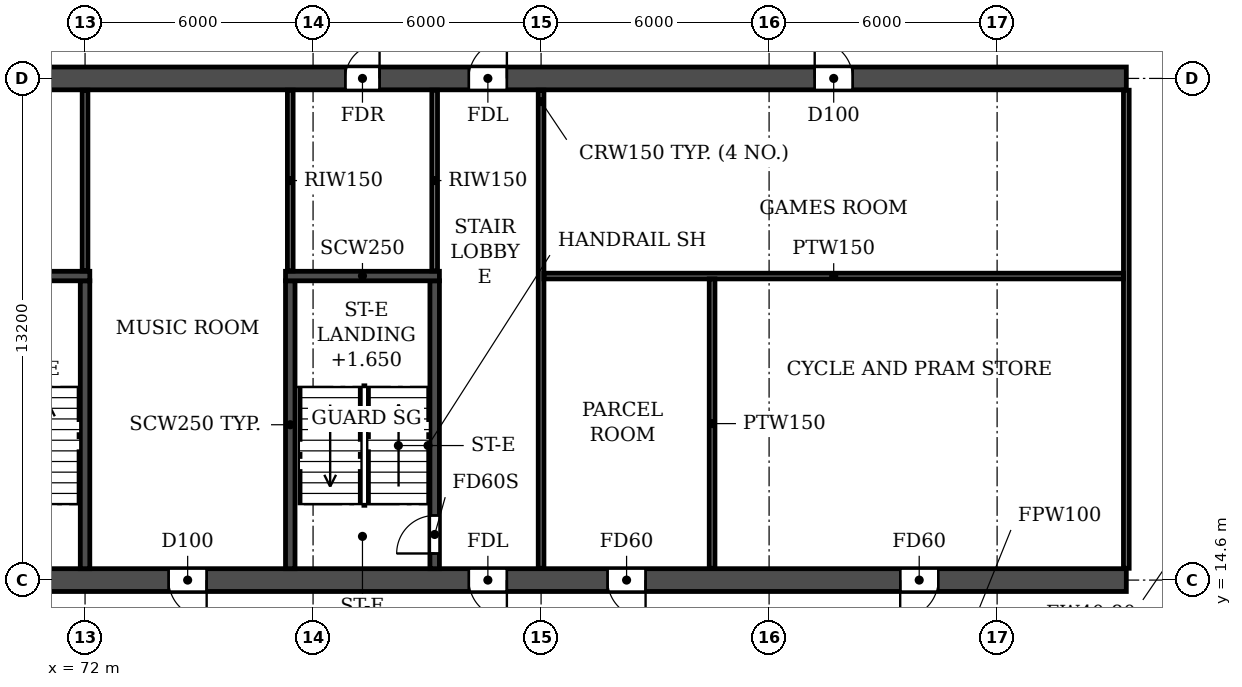
"""IFC4 building model, lengths in metres.
Left out: names, types, materials, properties, quantities, classifications, styles, units other than length and angle.
Written with IfcOpenShell. Run it as: python <this file> out.ifc"""

import sys

from ifc_helpers import new_model, si_unit, direction, frame, frame_2d, origin, place, context, subcontext, project, spatial, rectangle, extrude, element, fill, save


model = new_model("IFC4")
c1 = context("Model", 3, precision=1e-05, world=origin(), true_north=direction((0.0, 1.0)))
c2 = subcontext(c1, "Body", "Model", "MODEL_VIEW")
j1 = project(units=[si_unit("LENGTHUNIT", "METRE"), si_unit("PLANEANGLEUNIT", "RADIAN")], contexts=[c1])
p1 = place(None, origin())
s1 = spatial("IfcSite", under=j1, at=p1, CompositionType="ELEMENT")
p2 = place(p1, origin())
s2 = spatial("IfcBuilding", under=s1, at=p2, CompositionType="ELEMENT")
p3 = place(p2, frame((0.0, 0.0, 23.4)))
s3 = spatial("IfcBuildingStorey", under=s2, at=p3, CompositionType="ELEMENT", Elevation=23.4)
p4 = place(p3, frame((2.6, 14.6, 0.0), z_axis=(0.0, 0.0, 1.0), x_axis=(1.0, 0.0, 0.0)))
e1 = element("IfcWall", 1, at=p4, inside=s3, PredefinedType="SOLIDWALL", context=c2, shape_type="SweptSolid", body=[
    extrude(rectangle(XDim=96.8, YDim=0.6, at=frame_2d((48.4, 0.0))), origin(), (0.0, 0.0, 1.0), 3.05),
])
p5 = place(p4, frame((7.2, 0.0, 0.0)))
e2 = element("IfcOpeningElement", 2, at=p5, cuts=e1, PredefinedType="OPENING", context=c2, shape_type="SweptSolid", body=[
    extrude(rectangle(XDim=1.0, YDim=2.1, at=frame_2d((0.5, 1.05))), frame((0.0, 0.31, 0.0), z_axis=(0.0, -1.0, 0.0), x_axis=(1.0, 0.0, 0.0)), (0.0, 0.0, 1.0), 0.62),
])
p6 = place(p4, frame((16.3, 0.0, 0.0)))
e3 = element("IfcOpeningElement", 3, at=p6, cuts=e1, PredefinedType="OPENING", context=c2, shape_type="SweptSolid", body=[
    extrude(rectangle(XDim=1.0, YDim=2.1, at=frame_2d((0.5, 1.05))), frame((0.0, 0.31, 0.0), z_axis=(0.0, -1.0, 0.0), x_axis=(1.0, 0.0, 0.0)), (0.0, 0.0, 1.0), 0.62),
])
p7 = place(p4, frame((24.2, 0.0, 0.0)))
e4 = element("IfcOpeningElement", 4, at=p7, cuts=e1, PredefinedType="OPENING", context=c2, shape_type="SweptSolid", body=[
    extrude(rectangle(XDim=1.0, YDim=2.1, at=frame_2d((0.5, 1.05))), frame((0.0, 0.31, 0.0), z_axis=(0.0, -1.0, 0.0), x_axis=(1.0, 0.0, 0.0)), (0.0, 0.0, 1.0), 0.62),
])
p8 = place(p4, frame((28.8, 0.0, 0.0)))
e5 = element("IfcOpeningElement", 5, at=p8, cuts=e1, PredefinedType="OPENING", context=c2, shape_type="SweptSolid", body=[
    extrude(rectangle(XDim=1.0, YDim=2.1, at=frame_2d((0.5, 1.05))), frame((0.0, 0.31, 0.0), z_axis=(0.0, -1.0, 0.0), x_axis=(1.0, 0.0, 0.0)), (0.0, 0.0, 1.0), 0.62),
])
p9 = place(p4, frame((40.1, 0.0, 0.0)))
e6 = element("IfcOpeningElement", 6, at=p9, cuts=e1, PredefinedType="OPENING", context=c2, shape_type="SweptSolid", body=[
    extrude(rectangle(XDim=1.0, YDim=2.1, at=frame_2d((0.5, 1.05))), frame((0.0, 0.31, 0.0), z_axis=(0.0, -1.0, 0.0), x_axis=(1.0, 0.0, 0.0)), (0.0, 0.0, 1.0), 0.62),
])
p10 = place(p4, frame((44.0, 0.0, 0.0)))
e7 = element("IfcOpeningElement", 7, at=p10, cuts=e1, PredefinedType="OPENING", context=c2, shape_type="SweptSolid", body=[
    extrude(rectangle(XDim=1.0, YDim=2.1, at=frame_2d((0.5, 1.05))), frame((0.0, 0.31, 0.0), z_axis=(0.0, -1.0, 0.0), x_axis=(1.0, 0.0, 0.0)), (0.0, 0.0, 1.0), 0.62),
])
p11 = place(p4, frame((47.9, 0.0, 0.0)))
e8 = element("IfcOpeningElement", 8, at=p11, cuts=e1, PredefinedType="OPENING", context=c2, shape_type="SweptSolid", body=[
    extrude(rectangle(XDim=1.0, YDim=2.1, at=frame_2d((0.5, 1.05))), frame((0.0, 0.31, 0.0), z_axis=(0.0, -1.0, 0.0), x_axis=(1.0, 0.0, 0.0)), (0.0, 0.0, 1.0), 0.62),
])
p12 = place(p4, frame((53.1, 0.0, 0.0)))
e9 = element("IfcOpeningElement", 9, at=p12, cuts=e1, PredefinedType="OPENING", context=c2, shape_type="SweptSolid", body=[
    extrude(rectangle(XDim=1.0, YDim=2.1, at=frame_2d((0.5, 1.05))), frame((0.0, 0.31, 0.0), z_axis=(0.0, -1.0, 0.0), x_axis=(1.0, 0.0, 0.0)), (0.0, 0.0, 1.0), 0.62),
])
p13 = place(p4, frame((67.0, 0.0, 0.0)))
e10 = element("IfcOpeningElement", 10, at=p13, cuts=e1, PredefinedType="OPENING", context=c2, shape_type="SweptSolid", body=[
    extrude(rectangle(XDim=1.0, YDim=2.1, at=frame_2d((0.5, 1.05))), frame((0.0, 0.31, 0.0), z_axis=(0.0, -1.0, 0.0), x_axis=(1.0, 0.0, 0.0)), (0.0, 0.0, 1.0), 0.62),
])
p14 = place(p4, frame((71.6, 0.0, 0.0)))
e11 = element("IfcOpeningElement", 11, at=p14, cuts=e1, PredefinedType="OPENING", context=c2, shape_type="SweptSolid", body=[
    extrude(rectangle(XDim=1.0, YDim=2.1, at=frame_2d((0.5, 1.05))), frame((0.0, 0.31, 0.0), z_axis=(0.0, -1.0, 0.0), x_axis=(1.0, 0.0, 0.0)), (0.0, 0.0, 1.0), 0.62),
])
p15 = place(p4, frame((79.5, 0.0, 0.0)))
e12 = element("IfcOpeningElement", 12, at=p15, cuts=e1, PredefinedType="OPENING", context=c2, shape_type="SweptSolid", body=[
    extrude(rectangle(XDim=1.0, YDim=2.1, at=frame_2d((0.5, 1.05))), frame((0.0, 0.31, 0.0), z_axis=(0.0, -1.0, 0.0), x_axis=(1.0, 0.0, 0.0)), (0.0, 0.0, 1.0), 0.62),
])
p16 = place(p4, frame((83.15, 0.0, 0.0)))
e13 = element("IfcOpeningElement", 13, at=p16, cuts=e1, PredefinedType="OPENING", context=c2, shape_type="SweptSolid", body=[
    extrude(rectangle(XDim=1.0, YDim=2.1, at=frame_2d((0.5, 1.05))), frame((0.0, 0.31, 0.0), z_axis=(0.0, -1.0, 0.0), x_axis=(1.0, 0.0, 0.0)), (0.0, 0.0, 1.0), 0.62),
])
p17 = place(p4, frame((90.85, 0.0, 0.0)))
e14 = element("IfcOpeningElement", 14, at=p17, cuts=e1, PredefinedType="OPENING", context=c2, shape_type="SweptSolid", body=[
    extrude(rectangle(XDim=1.0, YDim=2.1, at=frame_2d((0.5, 1.05))), frame((0.0, 0.31, 0.0), z_axis=(0.0, -1.0, 0.0), x_axis=(1.0, 0.0, 0.0)), (0.0, 0.0, 1.0), 0.62),
])
p18 = place(p3, frame((2.6, 27.8, 0.0), z_axis=(0.0, 0.0, 1.0), x_axis=(1.0, 0.0, 0.0)))
e15 = element("IfcWall", 15, at=p18, inside=s3, PredefinedType="SOLIDWALL", context=c2, shape_type="SweptSolid", body=[
    extrude(rectangle(XDim=96.8, YDim=0.6, at=frame_2d((48.4, 0.0))), origin(), (0.0, 0.0, 1.0), 3.05),
])
p19 = place(p18, frame((1.8, 0.0, 0.0)))
e16 = element("IfcOpeningElement", 16, at=p19, cuts=e15, PredefinedType="OPENING", context=c2, shape_type="SweptSolid", body=[
    extrude(rectangle(XDim=1.0, YDim=2.1, at=frame_2d((0.5, 1.05))), frame((0.0, 0.31, 0.0), z_axis=(0.0, -1.0, 0.0), x_axis=(1.0, 0.0, 0.0)), (0.0, 0.0, 1.0), 0.62),
])
p20 = place(p18, frame((9.5, 0.0, 0.0)))
e17 = element("IfcOpeningElement", 17, at=p20, cuts=e15, PredefinedType="OPENING", context=c2, shape_type="SweptSolid", body=[
    extrude(rectangle(XDim=1.0, YDim=2.1, at=frame_2d((0.5, 1.05))), frame((0.0, 0.31, 0.0), z_axis=(0.0, -1.0, 0.0), x_axis=(1.0, 0.0, 0.0)), (0.0, 0.0, 1.0), 0.62),
])
p21 = place(p18, frame((16.3, 0.0, 0.0)))
e18 = element("IfcOpeningElement", 18, at=p21, cuts=e15, PredefinedType="OPENING", context=c2, shape_type="SweptSolid", body=[
    extrude(rectangle(XDim=1.0, YDim=2.1, at=frame_2d((0.5, 1.05))), frame((0.0, 0.31, 0.0), z_axis=(0.0, -1.0, 0.0), x_axis=(1.0, 0.0, 0.0)), (0.0, 0.0, 1.0), 0.62),
])
p22 = place(p18, frame((19.65, 0.0, 0.0)))
e19 = element("IfcOpeningElement", 19, at=p22, cuts=e15, PredefinedType="OPENING", context=c2, shape_type="SweptSolid", body=[
    extrude(rectangle(XDim=0.9, YDim=2.1, at=frame_2d((0.45, 1.05))), frame((0.0, 0.31, 0.0), z_axis=(0.0, -1.0, 0.0), x_axis=(1.0, 0.0, 0.0)), (0.0, 0.0, 1.0), 0.62),
])
p23 = place(p18, frame((28.85, 0.0, 0.0)))
e20 = element("IfcOpeningElement", 20, at=p23, cuts=e15, PredefinedType="OPENING", context=c2, shape_type="SweptSolid", body=[
    extrude(rectangle(XDim=0.9, YDim=2.1, at=frame_2d((0.45, 1.05))), frame((0.0, 0.31, 0.0), z_axis=(0.0, -1.0, 0.0), x_axis=(1.0, 0.0, 0.0)), (0.0, 0.0, 1.0), 0.62),
])
p24 = place(p18, frame((32.0, 0.0, 0.0)))
e21 = element("IfcOpeningElement", 21, at=p24, cuts=e15, PredefinedType="OPENING", context=c2, shape_type="SweptSolid", body=[
    extrude(rectangle(XDim=1.0, YDim=2.1, at=frame_2d((0.5, 1.05))), frame((0.0, 0.31, 0.0), z_axis=(0.0, -1.0, 0.0), x_axis=(1.0, 0.0, 0.0)), (0.0, 0.0, 1.0), 0.62),
])
p25 = place(p18, frame((37.2, 0.0, 0.0)))
e22 = element("IfcOpeningElement", 22, at=p25, cuts=e15, PredefinedType="OPENING", context=c2, shape_type="SweptSolid", body=[
    extrude(rectangle(XDim=1.0, YDim=2.1, at=frame_2d((0.5, 1.05))), frame((0.0, 0.31, 0.0), z_axis=(0.0, -1.0, 0.0), x_axis=(1.0, 0.0, 0.0)), (0.0, 0.0, 1.0), 0.62),
])
p26 = place(p18, frame((45.0, 0.0, 0.0)))
e23 = element("IfcOpeningElement", 23, at=p26, cuts=e15, PredefinedType="OPENING", context=c2, shape_type="SweptSolid", body=[
    extrude(rectangle(XDim=1.0, YDim=2.1, at=frame_2d((0.5, 1.05))), frame((0.0, 0.31, 0.0), z_axis=(0.0, -1.0, 0.0), x_axis=(1.0, 0.0, 0.0)), (0.0, 0.0, 1.0), 0.62),
])
p27 = place(p18, frame((47.9, 0.0, 0.0)))
e24 = element("IfcOpeningElement", 24, at=p27, cuts=e15, PredefinedType="OPENING", context=c2, shape_type="SweptSolid", body=[
    extrude(rectangle(XDim=1.0, YDim=2.1, at=frame_2d((0.5, 1.05))), frame((0.0, 0.31, 0.0), z_axis=(0.0, -1.0, 0.0), x_axis=(1.0, 0.0, 0.0)), (0.0, 0.0, 1.0), 0.62),
])
p28 = place(p18, frame((52.1, 0.0, 0.0)))
e25 = element("IfcOpeningElement", 25, at=p28, cuts=e15, PredefinedType="OPENING", context=c2, shape_type="SweptSolid", body=[
    extrude(rectangle(XDim=1.0, YDim=2.1, at=frame_2d((0.5, 1.05))), frame((0.0, 0.31, 0.0), z_axis=(0.0, -1.0, 0.0), x_axis=(1.0, 0.0, 0.0)), (0.0, 0.0, 1.0), 0.62),
])
p29 = place(p18, frame((56.0, 0.0, 0.0)))
e26 = element("IfcOpeningElement", 26, at=p29, cuts=e15, PredefinedType="OPENING", context=c2, shape_type="SweptSolid", body=[
    extrude(rectangle(XDim=1.0, YDim=2.1, at=frame_2d((0.5, 1.05))), frame((0.0, 0.31, 0.0), z_axis=(0.0, -1.0, 0.0), x_axis=(1.0, 0.0, 0.0)), (0.0, 0.0, 1.0), 0.62),
])
p30 = place(p18, frame((58.6, 0.0, 0.0)))
e27 = element("IfcOpeningElement", 27, at=p30, cuts=e15, PredefinedType="OPENING", context=c2, shape_type="SweptSolid", body=[
    extrude(rectangle(XDim=1.0, YDim=2.1, at=frame_2d((0.5, 1.05))), frame((0.0, 0.31, 0.0), z_axis=(0.0, -1.0, 0.0), x_axis=(1.0, 0.0, 0.0)), (0.0, 0.0, 1.0), 0.62),
])
p31 = place(p18, frame((61.2, 0.0, 0.0)))
e28 = element("IfcOpeningElement", 28, at=p31, cuts=e15, PredefinedType="OPENING", context=c2, shape_type="SweptSolid", body=[
    extrude(rectangle(XDim=1.0, YDim=2.1, at=frame_2d((0.5, 1.05))), frame((0.0, 0.31, 0.0), z_axis=(0.0, -1.0, 0.0), x_axis=(1.0, 0.0, 0.0)), (0.0, 0.0, 1.0), 0.62),
])
p32 = place(p18, frame((63.8, 0.0, 0.0)))
e29 = element("IfcOpeningElement", 29, at=p32, cuts=e15, PredefinedType="OPENING", context=c2, shape_type="SweptSolid", body=[
    extrude(rectangle(XDim=1.0, YDim=2.1, at=frame_2d((0.5, 1.05))), frame((0.0, 0.31, 0.0), z_axis=(0.0, -1.0, 0.0), x_axis=(1.0, 0.0, 0.0)), (0.0, 0.0, 1.0), 0.62),
])
p33 = place(p18, frame((67.05, 0.0, 0.0)))
e30 = element("IfcOpeningElement", 30, at=p33, cuts=e15, PredefinedType="OPENING", context=c2, shape_type="SweptSolid", body=[
    extrude(rectangle(XDim=0.9, YDim=2.1, at=frame_2d((0.45, 1.05))), frame((0.0, 0.31, 0.0), z_axis=(0.0, -1.0, 0.0), x_axis=(1.0, 0.0, 0.0)), (0.0, 0.0, 1.0), 0.62),
])
p34 = place(p18, frame((76.25, 0.0, 0.0)))
e31 = element("IfcOpeningElement", 31, at=p34, cuts=e15, PredefinedType="OPENING", context=c2, shape_type="SweptSolid", body=[
    extrude(rectangle(XDim=0.9, YDim=2.1, at=frame_2d((0.45, 1.05))), frame((0.0, 0.31, 0.0), z_axis=(0.0, -1.0, 0.0), x_axis=(1.0, 0.0, 0.0)), (0.0, 0.0, 1.0), 0.62),
])
p35 = place(p18, frame((79.5, 0.0, 0.0)))
e32 = element("IfcOpeningElement", 32, at=p35, cuts=e15, PredefinedType="OPENING", context=c2, shape_type="SweptSolid", body=[
    extrude(rectangle(XDim=1.0, YDim=2.1, at=frame_2d((0.5, 1.05))), frame((0.0, 0.31, 0.0), z_axis=(0.0, -1.0, 0.0), x_axis=(1.0, 0.0, 0.0)), (0.0, 0.0, 1.0), 0.62),
])
p36 = place(p18, frame((88.6, 0.0, 0.0)))
e33 = element("IfcOpeningElement", 33, at=p36, cuts=e15, PredefinedType="OPENING", context=c2, shape_type="SweptSolid", body=[
    extrude(rectangle(XDim=1.0, YDim=2.1, at=frame_2d((0.5, 1.05))), frame((0.0, 0.31, 0.0), z_axis=(0.0, -1.0, 0.0), x_axis=(1.0, 0.0, 0.0)), (0.0, 0.0, 1.0), 0.62),
])
p37 = place(p3, frame((72.0, 14.9, 0.0), z_axis=(0.0, 0.0, 1.0), x_axis=(0.0, 1.0, 0.0)))
e34 = element("IfcWall", 34, at=p37, inside=s3, PredefinedType="SOLIDWALL", context=c2, shape_type="SweptSolid", body=[
    extrude(rectangle(XDim=7.575, YDim=0.25, at=frame_2d((3.788, 0.0))), origin(), (0.0, 0.0, 1.0), 3.05),
])
p38 = place(p3, frame((68.075, 22.6, 0.0), z_axis=(0.0, 0.0, 1.0), x_axis=(1.0, 0.0, 0.0)))
e35 = element("IfcWall", 35, at=p38, inside=s3, PredefinedType="SOLIDWALL", context=c2, shape_type="SweptSolid", body=[
    extrude(rectangle(XDim=4.05, YDim=0.25, at=frame_2d((2.025, 0.0))), origin(), (0.0, 0.0, 1.0), 3.05),
])
p39 = place(p3, frame((77.4, 14.9, 0.0), z_axis=(0.0, 0.0, 1.0), x_axis=(0.0, 1.0, 0.0)))
e36 = element("IfcWall", 36, at=p39, inside=s3, PredefinedType="SOLIDWALL", context=c2, shape_type="SweptSolid", body=[
    extrude(rectangle(XDim=7.575, YDim=0.25, at=frame_2d((3.788, 0.0))), origin(), (0.0, 0.0, 1.0), 3.05),
])
p40 = place(p3, frame((81.2, 14.9, 0.0), z_axis=(0.0, 0.0, 1.0), x_axis=(0.0, 1.0, 0.0)))
e37 = element("IfcWall", 37, at=p40, inside=s3, PredefinedType="SOLIDWALL", context=c2, shape_type="SweptSolid", body=[
    extrude(rectangle(XDim=7.575, YDim=0.25, at=frame_2d((3.788, 0.0))), origin(), (0.0, 0.0, 1.0), 3.05),
])
p41 = place(p40, frame((0.4, 0.0, 0.0)))
e38 = element("IfcOpeningElement", 38, at=p41, cuts=e37, PredefinedType="OPENING", context=c2, shape_type="SweptSolid", body=[
    extrude(rectangle(XDim=1.0, YDim=2.1, at=frame_2d((0.5, 1.05))), frame((0.0, 0.135, 0.0), z_axis=(0.0, -1.0, 0.0), x_axis=(1.0, 0.0, 0.0)), (0.0, 0.0, 1.0), 0.27),
])
p42 = place(p3, frame((77.275, 22.6, 0.0), z_axis=(0.0, 0.0, 1.0), x_axis=(1.0, 0.0, 0.0)))
e39 = element("IfcWall", 39, at=p42, inside=s3, PredefinedType="SOLIDWALL", context=c2, shape_type="SweptSolid", body=[
    extrude(rectangle(XDim=4.05, YDim=0.25, at=frame_2d((2.025, 0.0))), origin(), (0.0, 0.0, 1.0), 3.05),
])
for number, where, z_axis, x_axis in (
    (40, (84.0, 14.91, 0.0), (0.0, 0.0, 1.0), (0.0, 1.0, 0.0)),
    (41, (99.4, 14.91, 0.0), (0.0, 0.0, 1.0), (0.0, 1.0, 0.0)),
):
    element("IfcWall", number, at=place(p3, frame(where, z_axis=z_axis, x_axis=x_axis)), inside=s3, PredefinedType="PARTITIONING", context=c2, shape_type="SweptSolid", body=[
        extrude(rectangle(XDim=12.58, YDim=0.15, at=frame_2d((6.29, 0.0))), origin(), (0.0, 0.0, 1.0), 3.05),
    ])
p43 = place(p3, frame((84.075, 22.6, 0.0), z_axis=(0.0, 0.0, 1.0), x_axis=(1.0, 0.0, 0.0)))
e42 = element("IfcWall", 42, at=p43, inside=s3, PredefinedType="PARTITIONING", context=c2, shape_type="SweptSolid", body=[
    extrude(rectangle(XDim=15.25, YDim=0.15, at=frame_2d((7.625, 0.0))), origin(), (0.0, 0.0, 1.0), 3.05),
])
p44 = place(p3, frame((88.5, 14.91, 0.0), z_axis=(0.0, 0.0, 1.0), x_axis=(0.0, 1.0, 0.0)))
e43 = element("IfcWall", 43, at=p44, inside=s3, PredefinedType="PARTITIONING", context=c2, shape_type="SweptSolid", body=[
    extrude(rectangle(XDim=7.615, YDim=0.15, at=frame_2d((3.808, 0.0))), origin(), (0.0, 0.0, 1.0), 3.05),
])
for number, where, z_axis, x_axis in (
    (44, (72.0, 22.735, 0.0), (0.0, 0.0, 1.0), (0.0, 1.0, 0.0)),
    (45, (77.4, 22.735, 0.0), (0.0, 0.0, 1.0), (0.0, 1.0, 0.0)),
    (46, (81.2, 22.735, 0.0), (0.0, 0.0, 1.0), (0.0, 1.0, 0.0)),
):
    element("IfcWall", number, at=place(p3, frame(where, z_axis=z_axis, x_axis=x_axis)), inside=s3, PredefinedType="PARTITIONING", context=c2, shape_type="SweptSolid", body=[
        extrude(rectangle(XDim=4.755, YDim=0.15, at=frame_2d((2.377, 0.0))), origin(), (0.0, 0.0, 1.0), 3.05),
    ])
p45 = place(p34, origin())
e47 = element("IfcDoor", 47, at=p45, inside=s3, OperationType="SINGLE_SWING_RIGHT", PredefinedType="DOOR", context=c2, shape_type="SweptSolid", body=[
    extrude(rectangle(XDim=0.9, YDim=2.1, at=frame_2d((0.45, 1.05))), frame((0.0, 0.025, 0.0), z_axis=(0.0, -1.0, 0.0), x_axis=(1.0, 0.0, 0.0)), (0.0, 0.0, 1.0), 0.05),
])
fill(e31, e47)
p46 = place(p35, origin())
e48 = element("IfcDoor", 48, at=p46, inside=s3, OperationType="SINGLE_SWING_RIGHT", PredefinedType="DOOR", context=c2, shape_type="SweptSolid", body=[
    extrude(rectangle(XDim=1.0, YDim=2.1, at=frame_2d((0.5, 1.05))), frame((0.0, 0.025, 0.0), z_axis=(0.0, -1.0, 0.0), x_axis=(1.0, 0.0, 0.0)), (0.0, 0.0, 1.0), 0.05),
])
fill(e32, e48)
p47 = place(p36, origin())
e49 = element("IfcDoor", 49, at=p47, inside=s3, OperationType="SINGLE_SWING_LEFT", PredefinedType="DOOR", context=c2, shape_type="SweptSolid", body=[
    extrude(rectangle(XDim=1.0, YDim=2.1, at=frame_2d((0.5, 1.05))), frame((0.0, 0.025, 0.0), z_axis=(0.0, -1.0, 0.0), x_axis=(1.0, 0.0, 0.0)), (0.0, 0.0, 1.0), 0.05),
])
fill(e33, e49)
p48 = place(p14, frame((1.0, 0.0, 0.0), z_axis=(0.0, 0.0, 1.0), x_axis=(-1.0, 0.0, 0.0)))
e50 = element("IfcDoor", 50, at=p48, inside=s3, OperationType="SINGLE_SWING_LEFT", PredefinedType="DOOR", context=c2, shape_type="SweptSolid", body=[
    extrude(rectangle(XDim=1.0, YDim=2.1, at=frame_2d((0.5, 1.05))), frame((0.0, 0.025, 0.0), z_axis=(0.0, -1.0, 0.0), x_axis=(1.0, 0.0, 0.0)), (0.0, 0.0, 1.0), 0.05),
])
fill(e11, e50)
p49 = place(p15, frame((1.0, 0.0, 0.0), z_axis=(0.0, 0.0, 1.0), x_axis=(-1.0, 0.0, 0.0)))
e51 = element("IfcDoor", 51, at=p49, inside=s3, OperationType="SINGLE_SWING_LEFT", PredefinedType="DOOR", context=c2, shape_type="SweptSolid", body=[
    extrude(rectangle(XDim=1.0, YDim=2.1, at=frame_2d((0.5, 1.05))), frame((0.0, 0.025, 0.0), z_axis=(0.0, -1.0, 0.0), x_axis=(1.0, 0.0, 0.0)), (0.0, 0.0, 1.0), 0.05),
])
fill(e12, e51)
p50 = place(p16, frame((1.0, 0.0, 0.0), z_axis=(0.0, 0.0, 1.0), x_axis=(-1.0, 0.0, 0.0)))
e52 = element("IfcDoor", 52, at=p50, inside=s3, OperationType="SINGLE_SWING_LEFT", PredefinedType="DOOR", context=c2, shape_type="SweptSolid", body=[
    extrude(rectangle(XDim=1.0, YDim=2.1, at=frame_2d((0.5, 1.05))), frame((0.0, 0.025, 0.0), z_axis=(0.0, -1.0, 0.0), x_axis=(1.0, 0.0, 0.0)), (0.0, 0.0, 1.0), 0.05),
])
fill(e13, e52)
p51 = place(p17, frame((1.0, 0.0, 0.0), z_axis=(0.0, 0.0, 1.0), x_axis=(-1.0, 0.0, 0.0)))
e53 = element("IfcDoor", 53, at=p51, inside=s3, OperationType="SINGLE_SWING_RIGHT", PredefinedType="DOOR", context=c2, shape_type="SweptSolid", body=[
    extrude(rectangle(XDim=1.0, YDim=2.1, at=frame_2d((0.5, 1.05))), frame((0.0, 0.025, 0.0), z_axis=(0.0, -1.0, 0.0), x_axis=(1.0, 0.0, 0.0)), (0.0, 0.0, 1.0), 0.05),
])
fill(e14, e53)
p52 = place(p41, origin())
e54 = element("IfcDoor", 54, at=p52, inside=s3, OperationType="SINGLE_SWING_LEFT", PredefinedType="DOOR", context=c2, shape_type="SweptSolid", body=[
    extrude(rectangle(XDim=1.0, YDim=2.1, at=frame_2d((0.5, 1.05))), frame((0.0, 0.025, 0.0), z_axis=(0.0, -1.0, 0.0), x_axis=(1.0, 0.0, 0.0)), (0.0, 0.0, 1.0), 0.05),
])
fill(e38, e54)
save(model, sys.argv[1])
